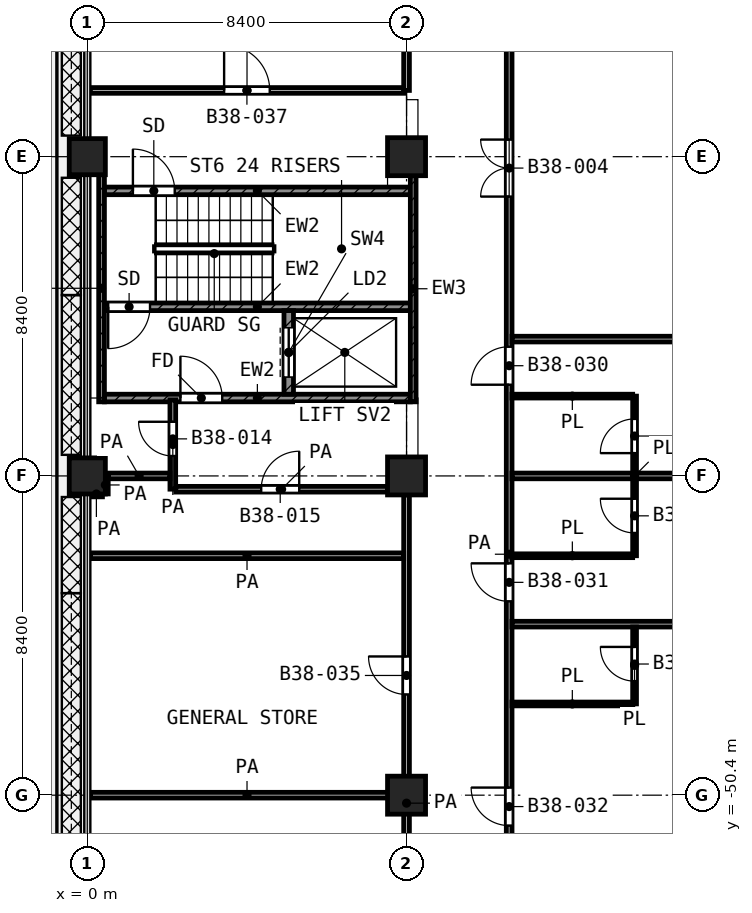
"""IFC4 building model, lengths in metres.
Left out: names, types, materials, properties, quantities, classifications, styles, units other than length and angle.
Written with IfcOpenShell. Run it as: python <this file> out.ifc"""

import sys

from ifc_helpers import new_model, si_unit, direction, frame, frame_2d, origin, origin_2d, place, context, subcontext, project, spatial, rectangle, extrude, element, fill, save


model = new_model("IFC4")
c1 = context("Model", 3, precision=1e-05, world=origin(), true_north=direction((0.0, 1.0)))
c2 = subcontext(c1, "Body", "Model", "MODEL_VIEW")
j1 = project(units=[si_unit("LENGTHUNIT", "METRE"), si_unit("PLANEANGLEUNIT", "RADIAN")], contexts=[c1])
p1 = place(None, origin())
s1 = spatial("IfcSite", under=j1, at=p1, CompositionType="ELEMENT")
p2 = place(p1, origin())
s2 = spatial("IfcBuilding", under=s1, at=p2, CompositionType="ELEMENT")
p3 = place(p2, frame((0.0, 0.0, 166.8)))
s3 = spatial("IfcBuildingStorey", under=s2, at=p3, CompositionType="ELEMENT", Elevation=166.8)
p4 = place(p3, frame((0.0, -33.6, 0.0), z_axis=(0.0, 0.0, 1.0), x_axis=(1.0, 0.0, 0.0)))
e1 = element("IfcColumn", 1, at=p4, inside=s3, PredefinedType="COLUMN", context=c2, shape_type="SweptSolid", body=[
    extrude(rectangle(XDim=0.95, YDim=0.95, at=origin_2d()), origin(), (0.0, 0.0, 1.0), 4.2),
])
p5 = place(p3, frame((8.4, -33.6, 0.0), z_axis=(0.0, 0.0, 1.0), x_axis=(1.0, 0.0, 0.0)))
e2 = element("IfcColumn", 2, at=p5, inside=s3, PredefinedType="COLUMN", context=c2, shape_type="SweptSolid", body=[
    extrude(rectangle(XDim=1.0, YDim=1.0, at=origin_2d()), origin(), (0.0, 0.0, 1.0), 4.2),
])
p6 = place(p3, frame((0.0, -42.0, 0.0), z_axis=(0.0, 0.0, 1.0), x_axis=(1.0, 0.0, 0.0)))
e3 = element("IfcColumn", 3, at=p6, inside=s3, PredefinedType="COLUMN", context=c2, shape_type="SweptSolid", body=[
    extrude(rectangle(XDim=0.95, YDim=0.95, at=origin_2d()), origin(), (0.0, 0.0, 1.0), 4.2),
])
for number, where, z_axis, x_axis in (
    (4, (8.4, -42.0, 0.0), (0.0, 0.0, 1.0), (1.0, 0.0, 0.0)),
    (5, (8.4, -50.4, 0.0), (0.0, 0.0, 1.0), (1.0, 0.0, 0.0)),
):
    element("IfcColumn", number, at=place(p3, frame(where, z_axis=z_axis, x_axis=x_axis)), inside=s3, PredefinedType="COLUMN", context=c2, shape_type="SweptSolid", body=[
        extrude(rectangle(XDim=1.0, YDim=1.0, at=origin_2d()), origin(), (0.0, 0.0, 1.0), 4.2),
    ])
p7 = place(p3, frame((0.375, -40.05, 0.0), z_axis=(0.0, 0.0, 1.0), x_axis=(0.0, 1.0, 0.0)))
e6 = element("IfcWall", 6, at=p7, inside=s3, PredefinedType="SHEAR", context=c2, shape_type="SweptSolid", body=[
    extrude(rectangle(XDim=5.975, YDim=0.15, at=frame_2d((2.988, 0.0))), origin(), (0.0, 0.0, 1.0), 3.6),
])
p8 = place(p3, frame((8.575, -40.05, 0.0), z_axis=(0.0, 0.0, 1.0), x_axis=(0.0, 1.0, 0.0)))
e7 = element("IfcWall", 7, at=p8, inside=s3, PredefinedType="SHEAR", context=c2, shape_type="SweptSolid", body=[
    extrude(rectangle(XDim=5.95, YDim=0.15, at=frame_2d((2.975, 0.0))), origin(), (0.0, 0.0, 1.0), 3.6),
])
p9 = place(p3, frame((0.45, -34.5, 0.0), z_axis=(0.0, 0.0, 1.0), x_axis=(1.0, 0.0, 0.0)))
e8 = element("IfcWall", 8, at=p9, inside=s3, PredefinedType="SHEAR", context=c2, shape_type="SweptSolid", body=[
    extrude(rectangle(XDim=8.05, YDim=0.2, at=frame_2d((4.025, 0.0))), origin(), (0.0, 0.0, 1.0), 3.6),
])
p10 = place(p9, frame((0.75, 0.0, 0.0)))
e9 = element("IfcOpeningElement", 9, at=p10, cuts=e8, PredefinedType="OPENING", context=c2, shape_type="SweptSolid", body=[
    extrude(rectangle(XDim=1.1, YDim=2.1, at=frame_2d((0.55, 1.05))), frame((0.0, 0.11, 0.0), z_axis=(0.0, -1.0, 0.0), x_axis=(1.0, 0.0, 0.0)), (0.0, 0.0, 1.0), 0.22),
])
p11 = place(p3, frame((0.45, -37.55, 0.0), z_axis=(0.0, 0.0, 1.0), x_axis=(1.0, 0.0, 0.0)))
e10 = element("IfcWall", 10, at=p11, inside=s3, PredefinedType="SHEAR", context=c2, shape_type="SweptSolid", body=[
    extrude(rectangle(XDim=8.05, YDim=0.2, at=frame_2d((4.025, 0.0))), origin(), (0.0, 0.0, 1.0), 3.6),
])
p12 = place(p11, frame((0.1, 0.0, 0.0)))
e11 = element("IfcOpeningElement", 11, at=p12, cuts=e10, PredefinedType="OPENING", context=c2, shape_type="SweptSolid", body=[
    extrude(rectangle(XDim=1.1, YDim=2.1, at=frame_2d((0.55, 1.05))), frame((0.0, 0.11, 0.0), z_axis=(0.0, -1.0, 0.0), x_axis=(1.0, 0.0, 0.0)), (0.0, 0.0, 1.0), 0.22),
])
p13 = place(p3, frame((0.45, -39.95, 0.0), z_axis=(0.0, 0.0, 1.0), x_axis=(1.0, 0.0, 0.0)))
e12 = element("IfcWall", 12, at=p13, inside=s3, PredefinedType="SHEAR", context=c2, shape_type="SweptSolid", body=[
    extrude(rectangle(XDim=8.05, YDim=0.2, at=frame_2d((4.025, 0.0))), origin(), (0.0, 0.0, 1.0), 3.6),
])
p14 = place(p13, frame((2.0, 0.0, 0.0)))
e13 = element("IfcOpeningElement", 13, at=p14, cuts=e12, PredefinedType="OPENING", context=c2, shape_type="SweptSolid", body=[
    extrude(rectangle(XDim=1.1, YDim=2.1, at=frame_2d((0.55, 1.05))), frame((0.0, 0.11, 0.0), z_axis=(0.0, -1.0, 0.0), x_axis=(1.0, 0.0, 0.0)), (0.0, 0.0, 1.0), 0.22),
])
p15 = place(p3, frame((5.3, -39.85, 0.0), z_axis=(0.0, 0.0, 1.0), x_axis=(0.0, 1.0, 0.0)))
e14 = element("IfcWall", 14, at=p15, inside=s3, PredefinedType="SHEAR", context=c2, shape_type="SweptSolid", body=[
    extrude(rectangle(XDim=2.2, YDim=0.25, at=frame_2d((1.1, 0.0))), origin(), (0.0, 0.0, 1.0), 3.6),
])
p16 = place(p15, frame((0.45, 0.0, 0.0)))
e15 = element("IfcOpeningElement", 15, at=p16, cuts=e14, PredefinedType="OPENING", context=c2, shape_type="SweptSolid", body=[
    extrude(rectangle(XDim=1.3, YDim=2.1, at=frame_2d((0.65, 1.05))), frame((0.0, 0.135, 0.0), z_axis=(0.0, -1.0, 0.0), x_axis=(1.0, 0.0, 0.0)), (0.0, 0.0, 1.0), 0.27),
])
p17 = place(p3, frame((11.175, -48.0, 0.0), z_axis=(0.0, 0.0, 1.0), x_axis=(1.0, 0.0, 0.0)))
e16 = element("IfcWall", 16, at=p17, inside=s3, PredefinedType="PARTITIONING", context=c2, shape_type="SweptSolid", body=[
    extrude(rectangle(XDim=3.174, YDim=0.1, at=frame_2d((1.587, 0.0))), origin(), (0.0, 0.0, 1.0), 3.6),
])
for number, where, z_axis, x_axis in (
    (17, (11.175, -44.1, 0.0), (0.0, 0.0, 1.0), (1.0, 0.0, 0.0)),
    (18, (11.175, -39.9, 0.0), (0.0, 0.0, 1.0), (1.0, 0.0, 0.0)),
):
    element("IfcWall", number, at=place(p3, frame(where, z_axis=z_axis, x_axis=x_axis)), inside=s3, PredefinedType="PARTITIONING", context=c2, shape_type="SweptSolid", body=[
        extrude(rectangle(XDim=3.175, YDim=0.1, at=frame_2d((1.587, 0.0))), origin(), (0.0, 0.0, 1.0), 3.6),
    ])
p18 = place(p3, frame((14.4, -47.998, 0.0), z_axis=(0.0, 0.0, 1.0), x_axis=(0.0, 1.0, 0.0)))
e19 = element("IfcWall", 19, at=p18, inside=s3, PredefinedType="PARTITIONING", context=c2, shape_type="SweptSolid", body=[
    extrude(rectangle(XDim=2.023, YDim=0.1, at=frame_2d((1.011, 0.0))), origin(), (0.0, 0.0, 1.0), 3.6),
])
p19 = place(p18, frame((0.599, 0.0, 0.0)))
e20 = element("IfcOpeningElement", 20, at=p19, cuts=e19, PredefinedType="OPENING", context=c2, shape_type="SweptSolid", body=[
    extrude(rectangle(XDim=0.9, YDim=2.1, at=frame_2d((0.45, 1.05))), frame((0.0, 0.06, 0.0), z_axis=(0.0, -1.0, 0.0), x_axis=(1.0, 0.0, 0.0)), (0.0, 0.0, 1.0), 0.12),
])
p20 = place(p3, frame((14.4, -44.1, 0.0), z_axis=(0.0, 0.0, 1.0), x_axis=(0.0, 1.0, 0.0)))
e21 = element("IfcWall", 21, at=p20, inside=s3, PredefinedType="PARTITIONING", context=c2, shape_type="SweptSolid", body=[
    extrude(rectangle(XDim=4.2, YDim=0.1, at=frame_2d((2.1, 0.0))), origin(), (0.0, 0.0, 1.0), 3.6),
])
p21 = place(p20, frame((2.7, 0.0, 0.0)))
e22 = element("IfcOpeningElement", 22, at=p21, cuts=e21, PredefinedType="OPENING", context=c2, shape_type="SweptSolid", body=[
    extrude(rectangle(XDim=0.9, YDim=2.1, at=frame_2d((0.45, 1.05))), frame((0.0, 0.06, 0.0), z_axis=(0.0, -1.0, 0.0), x_axis=(1.0, 0.0, 0.0)), (0.0, 0.0, 1.0), 0.12),
])
p22 = place(p20, frame((0.6, 0.0, 0.0)))
e23 = element("IfcOpeningElement", 23, at=p22, cuts=e21, PredefinedType="OPENING", context=c2, shape_type="SweptSolid", body=[
    extrude(rectangle(XDim=0.9, YDim=2.1, at=frame_2d((0.45, 1.05))), frame((0.0, 0.06, 0.0), z_axis=(0.0, -1.0, 0.0), x_axis=(1.0, 0.0, 0.0)), (0.0, 0.0, 1.0), 0.12),
])
p23 = place(p3, frame((0.08, -50.4, 0.0), z_axis=(0.0, 0.0, 1.0), x_axis=(1.0, 0.0, 0.0)))
e24 = element("IfcWall", 24, at=p23, inside=s3, PredefinedType="PARTITIONING", context=c2, shape_type="SweptSolid", body=[
    extrude(rectangle(XDim=8.245, YDim=0.15, at=frame_2d((4.123, 0.0))), origin(), (0.0, 0.0, 1.0), 3.6),
])
p24 = place(p3, frame((11.175, -45.9, 0.0), z_axis=(0.0, 0.0, 1.0), x_axis=(1.0, 0.0, 0.0)))
e25 = element("IfcWall", 25, at=p24, inside=s3, PredefinedType="PARTITIONING", context=c2, shape_type="SweptSolid", body=[
    extrude(rectangle(XDim=13.945, YDim=0.15, at=frame_2d((6.973, 0.0))), origin(), (0.0, 0.0, 1.0), 3.6),
])
p25 = place(p3, frame((0.08, -44.1, 0.0), z_axis=(0.0, 0.0, 1.0), x_axis=(1.0, 0.0, 0.0)))
e26 = element("IfcWall", 26, at=p25, inside=s3, PredefinedType="PARTITIONING", context=c2, shape_type="SweptSolid", body=[
    extrude(rectangle(XDim=8.245, YDim=0.15, at=frame_2d((4.123, 0.0))), origin(), (0.0, 0.0, 1.0), 3.6),
])
p26 = place(p3, frame((0.08, -42.475, 0.0), z_axis=(0.0, 0.0, 1.0), x_axis=(1.0, 0.0, 0.0)))
e27 = element("IfcWall", 27, at=p26, inside=s3, PredefinedType="PARTITIONING", context=c2, shape_type="SweptSolid", body=[
    extrude(rectangle(XDim=0.318, YDim=0.15, at=frame_2d((0.159, 0.0))), origin(), (0.0, 0.0, 1.0), 3.6),
])
p27 = place(p3, frame((2.327, -42.35, 0.0), z_axis=(0.0, 0.0, 1.0), x_axis=(1.0, 0.0, 0.0)))
e28 = element("IfcWall", 28, at=p27, inside=s3, PredefinedType="PARTITIONING", context=c2, shape_type="SweptSolid", body=[
    extrude(rectangle(XDim=5.573, YDim=0.15, at=frame_2d((2.787, 0.0))), origin(), (0.0, 0.0, 1.0), 3.6),
])
p28 = place(p27, frame((2.249, 0.0, 0.0)))
e29 = element("IfcOpeningElement", 29, at=p28, cuts=e28, PredefinedType="OPENING", context=c2, shape_type="SweptSolid", body=[
    extrude(rectangle(XDim=1.0, YDim=2.1, at=frame_2d((0.5, 1.05))), frame((0.0, 0.085, 0.0), z_axis=(0.0, -1.0, 0.0), x_axis=(1.0, 0.0, 0.0)), (0.0, 0.0, 1.0), 0.17),
])
p29 = place(p3, frame((0.552, -42.0, 0.0), z_axis=(0.0, 0.0, 1.0), x_axis=(1.0, 0.0, 0.0)))
e30 = element("IfcWall", 30, at=p29, inside=s3, PredefinedType="PARTITIONING", context=c2, shape_type="SweptSolid", body=[
    extrude(rectangle(XDim=1.623, YDim=0.15, at=frame_2d((0.812, 0.0))), origin(), (0.0, 0.0, 1.0), 3.6),
])
for number, where, z_axis, x_axis in (
    (31, (11.175, -42.0, 0.0), (0.0, 0.0, 1.0), (1.0, 0.0, 0.0)),
    (32, (11.175, -38.4, 0.0), (0.0, 0.0, 1.0), (1.0, 0.0, 0.0)),
):
    element("IfcWall", number, at=place(p3, frame(where, z_axis=z_axis, x_axis=x_axis)), inside=s3, PredefinedType="PARTITIONING", context=c2, shape_type="SweptSolid", body=[
        extrude(rectangle(XDim=13.945, YDim=0.15, at=frame_2d((6.973, 0.0))), origin(), (0.0, 0.0, 1.0), 3.6),
    ])
p30 = place(p3, frame((0.08, -31.857, 0.0), z_axis=(0.0, 0.0, 1.0), x_axis=(1.0, 0.0, 0.0)))
e33 = element("IfcWall", 33, at=p30, inside=s3, PredefinedType="PARTITIONING", context=c2, shape_type="SweptSolid", body=[
    extrude(rectangle(XDim=8.245, YDim=0.15, at=frame_2d((4.123, 0.0))), origin(), (0.0, 0.0, 1.0), 3.6),
])
p31 = place(p30, frame((3.52, 0.0, 0.0)))
e34 = element("IfcOpeningElement", 34, at=p31, cuts=e33, PredefinedType="OPENING", context=c2, shape_type="SweptSolid", body=[
    extrude(rectangle(XDim=1.2, YDim=2.1, at=frame_2d((0.6, 1.05))), frame((0.0, 0.085, 0.0), z_axis=(0.0, -1.0, 0.0), x_axis=(1.0, 0.0, 0.0)), (0.0, 0.0, 1.0), 0.17),
])
p32 = place(p3, frame((0.475, -42.473, 0.0), z_axis=(0.0, 0.0, 1.0), x_axis=(0.0, 1.0, 0.0)))
e35 = element("IfcWall", 35, at=p32, inside=s3, PredefinedType="PARTITIONING", context=c2, shape_type="SweptSolid", body=[
    extrude(rectangle(XDim=0.471, YDim=0.15, at=frame_2d((0.235, 0.0))), origin(), (0.0, 0.0, 1.0), 3.6),
])
p33 = place(p3, frame((2.25, -42.348, 0.0), z_axis=(0.0, 0.0, 1.0), x_axis=(0.0, 1.0, 0.0)))
e36 = element("IfcWall", 36, at=p33, inside=s3, PredefinedType="PARTITIONING", context=c2, shape_type="SweptSolid", body=[
    extrude(rectangle(XDim=2.348, YDim=0.15, at=frame_2d((1.174, 0.0))), origin(), (0.0, 0.0, 1.0), 3.6),
])
p34 = place(p33, frame((0.873, 0.0, 0.0)))
e37 = element("IfcOpeningElement", 37, at=p34, cuts=e36, PredefinedType="OPENING", context=c2, shape_type="SweptSolid", body=[
    extrude(rectangle(XDim=0.9, YDim=2.1, at=frame_2d((0.45, 1.05))), frame((0.0, 0.085, 0.0), z_axis=(0.0, -1.0, 0.0), x_axis=(1.0, 0.0, 0.0)), (0.0, 0.0, 1.0), 0.17),
])
p35 = place(p3, frame((8.4, -58.72, 0.0), z_axis=(0.0, 0.0, 1.0), x_axis=(0.0, 1.0, 0.0)))
e38 = element("IfcWall", 38, at=p35, inside=s3, PredefinedType="PARTITIONING", context=c2, shape_type="SweptSolid", body=[
    extrude(rectangle(XDim=16.22, YDim=0.15, at=frame_2d((8.11, 0.0))), origin(), (0.0, 0.0, 1.0), 3.6),
])
p36 = place(p35, frame((3.37, 0.0, 0.0)))
e39 = element("IfcOpeningElement", 39, at=p36, cuts=e38, PredefinedType="OPENING", context=c2, shape_type="SweptSolid", body=[
    extrude(rectangle(XDim=1.5, YDim=2.1, at=frame_2d((0.75, 1.05))), frame((0.0, 0.085, 0.0), z_axis=(0.0, -1.0, 0.0), x_axis=(1.0, 0.0, 0.0)), (0.0, 0.0, 1.0), 0.17),
])
p37 = place(p35, frame((10.97, 0.0, 0.0)))
e40 = element("IfcOpeningElement", 40, at=p37, cuts=e38, PredefinedType="OPENING", context=c2, shape_type="SweptSolid", body=[
    extrude(rectangle(XDim=1.0, YDim=2.1, at=frame_2d((0.5, 1.05))), frame((0.0, 0.085, 0.0), z_axis=(0.0, -1.0, 0.0), x_axis=(1.0, 0.0, 0.0)), (0.0, 0.0, 1.0), 0.17),
])
p38 = place(p3, frame((8.4, -31.857, 0.0), z_axis=(0.0, 0.0, 1.0), x_axis=(0.0, 1.0, 0.0)))
e41 = element("IfcWall", 41, at=p38, inside=s3, PredefinedType="PARTITIONING", context=c2, shape_type="SweptSolid", body=[
    extrude(rectangle(XDim=6.957, YDim=0.15, at=frame_2d((3.479, 0.0))), origin(), (0.0, 0.0, 1.0), 3.6),
])
p39 = place(p3, frame((11.1, -58.72, 0.0), z_axis=(0.0, 0.0, 1.0), x_axis=(0.0, 1.0, 0.0)))
e42 = element("IfcWall", 42, at=p39, inside=s3, PredefinedType="PARTITIONING", context=c2, shape_type="SweptSolid", body=[
    extrude(rectangle(XDim=29.32, YDim=0.15, at=frame_2d((14.66, 0.0))), origin(), (0.0, 0.0, 1.0), 3.6),
])
p40 = place(p39, frame((24.07, 0.0, 0.0)))
e43 = element("IfcOpeningElement", 43, at=p40, cuts=e42, PredefinedType="OPENING", context=c2, shape_type="SweptSolid", body=[
    extrude(rectangle(XDim=1.5, YDim=2.1, at=frame_2d((0.75, 1.05))), frame((0.0, 0.085, 0.0), z_axis=(0.0, -1.0, 0.0), x_axis=(1.0, 0.0, 0.0)), (0.0, 0.0, 1.0), 0.17),
])
p41 = place(p39, frame((19.12, 0.0, 0.0)))
e44 = element("IfcOpeningElement", 44, at=p41, cuts=e42, PredefinedType="OPENING", context=c2, shape_type="SweptSolid", body=[
    extrude(rectangle(XDim=1.0, YDim=2.1, at=frame_2d((0.5, 1.05))), frame((0.0, 0.085, 0.0), z_axis=(0.0, -1.0, 0.0), x_axis=(1.0, 0.0, 0.0)), (0.0, 0.0, 1.0), 0.17),
])
p42 = place(p39, frame((13.42, 0.0, 0.0)))
e45 = element("IfcOpeningElement", 45, at=p42, cuts=e42, PredefinedType="OPENING", context=c2, shape_type="SweptSolid", body=[
    extrude(rectangle(XDim=1.0, YDim=2.1, at=frame_2d((0.5, 1.05))), frame((0.0, 0.085, 0.0), z_axis=(0.0, -1.0, 0.0), x_axis=(1.0, 0.0, 0.0)), (0.0, 0.0, 1.0), 0.17),
])
p43 = place(p39, frame((7.52, 0.0, 0.0)))
e46 = element("IfcOpeningElement", 46, at=p43, cuts=e42, PredefinedType="OPENING", context=c2, shape_type="SweptSolid", body=[
    extrude(rectangle(XDim=1.0, YDim=2.1, at=frame_2d((0.5, 1.05))), frame((0.0, 0.085, 0.0), z_axis=(0.0, -1.0, 0.0), x_axis=(1.0, 0.0, 0.0)), (0.0, 0.0, 1.0), 0.17),
])
p44 = place(p39, frame((4.82, 0.0, 0.0)))
e47 = element("IfcOpeningElement", 47, at=p44, cuts=e42, PredefinedType="OPENING", context=c2, shape_type="SweptSolid", body=[
    extrude(rectangle(XDim=1.0, YDim=2.1, at=frame_2d((0.5, 1.05))), frame((0.0, 0.085, 0.0), z_axis=(0.0, -1.0, 0.0), x_axis=(1.0, 0.0, 0.0)), (0.0, 0.0, 1.0), 0.17),
])
p45 = place(p39, frame((2.12, 0.0, 0.0)))
e48 = element("IfcOpeningElement", 48, at=p45, cuts=e42, PredefinedType="OPENING", context=c2, shape_type="SweptSolid", body=[
    extrude(rectangle(XDim=1.0, YDim=2.1, at=frame_2d((0.5, 1.05))), frame((0.0, 0.085, 0.0), z_axis=(0.0, -1.0, 0.0), x_axis=(1.0, 0.0, 0.0)), (0.0, 0.0, 1.0), 0.17),
])
p46 = place(p10, origin())
e49 = element("IfcDoor", 49, at=p46, inside=s3, OperationType="SINGLE_SWING_LEFT", PredefinedType="DOOR", context=c2, shape_type="SweptSolid", body=[
    extrude(rectangle(XDim=1.1, YDim=2.1, at=frame_2d((0.55, 1.05))), frame((0.0, 0.025, 0.0), z_axis=(0.0, -1.0, 0.0), x_axis=(1.0, 0.0, 0.0)), (0.0, 0.0, 1.0), 0.05),
])
fill(e9, e49)
p47 = place(p12, frame((1.1, 0.0, 0.0), z_axis=(0.0, 0.0, 1.0), x_axis=(-1.0, 0.0, 0.0)))
e50 = element("IfcDoor", 50, at=p47, inside=s3, OperationType="SINGLE_SWING_LEFT", PredefinedType="DOOR", context=c2, shape_type="SweptSolid", body=[
    extrude(rectangle(XDim=1.1, YDim=2.1, at=frame_2d((0.55, 1.05))), frame((0.0, 0.025, 0.0), z_axis=(0.0, -1.0, 0.0), x_axis=(1.0, 0.0, 0.0)), (0.0, 0.0, 1.0), 0.05),
])
fill(e11, e50)
p48 = place(p16, origin())
e51 = element("IfcDoor", 51, at=p48, inside=s3, OperationType="DOUBLE_DOOR_SLIDING", PredefinedType="DOOR", context=c2, shape_type="SweptSolid", body=[
    extrude(rectangle(XDim=1.3, YDim=2.1, at=frame_2d((0.65, 1.05))), frame((0.0, 0.025, 0.0), z_axis=(0.0, -1.0, 0.0), x_axis=(1.0, 0.0, 0.0)), (0.0, 0.0, 1.0), 0.05),
])
fill(e15, e51)
p49 = place(p14, origin())
e52 = element("IfcDoor", 52, at=p49, inside=s3, OperationType="SINGLE_SWING_LEFT", PredefinedType="DOOR", context=c2, shape_type="SweptSolid", body=[
    extrude(rectangle(XDim=1.1, YDim=2.1, at=frame_2d((0.55, 1.05))), frame((0.0, 0.025, 0.0), z_axis=(0.0, -1.0, 0.0), x_axis=(1.0, 0.0, 0.0)), (0.0, 0.0, 1.0), 0.05),
])
fill(e13, e52)
p50 = place(p31, origin())
e53 = element("IfcDoor", 53, at=p50, inside=s3, OperationType="SINGLE_SWING_LEFT", PredefinedType="DOOR", context=c2, shape_type="SweptSolid", body=[
    extrude(rectangle(XDim=1.2, YDim=2.1, at=frame_2d((0.6, 1.05))), frame((0.0, 0.025, 0.0), z_axis=(0.0, -1.0, 0.0), x_axis=(1.0, 0.0, 0.0)), (0.0, 0.0, 1.0), 0.05),
])
fill(e34, e53)
p51 = place(p40, origin())
e54 = element("IfcDoor", 54, at=p51, inside=s3, OperationType="DOUBLE_DOOR_SINGLE_SWING", PredefinedType="DOOR", context=c2, shape_type="SweptSolid", body=[
    extrude(rectangle(XDim=1.5, YDim=2.1, at=frame_2d((0.75, 1.05))), frame((0.0, 0.025, 0.0), z_axis=(0.0, -1.0, 0.0), x_axis=(1.0, 0.0, 0.0)), (0.0, 0.0, 1.0), 0.05),
])
fill(e43, e54)
p52 = place(p41, origin())
e55 = element("IfcDoor", 55, at=p52, inside=s3, OperationType="SINGLE_SWING_LEFT", PredefinedType="DOOR", context=c2, shape_type="SweptSolid", body=[
    extrude(rectangle(XDim=1.0, YDim=2.1, at=frame_2d((0.5, 1.05))), frame((0.0, 0.025, 0.0), z_axis=(0.0, -1.0, 0.0), x_axis=(1.0, 0.0, 0.0)), (0.0, 0.0, 1.0), 0.05),
])
fill(e44, e55)
p53 = place(p21, origin())
e56 = element("IfcDoor", 56, at=p53, inside=s3, OperationType="SINGLE_SWING_LEFT", PredefinedType="DOOR", context=c2, shape_type="SweptSolid", body=[
    extrude(rectangle(XDim=0.9, YDim=2.1, at=frame_2d((0.45, 1.05))), frame((0.0, 0.025, 0.0), z_axis=(0.0, -1.0, 0.0), x_axis=(1.0, 0.0, 0.0)), (0.0, 0.0, 1.0), 0.05),
])
fill(e22, e56)
p54 = place(p42, origin())
e57 = element("IfcDoor", 57, at=p54, inside=s3, OperationType="SINGLE_SWING_RIGHT", PredefinedType="DOOR", context=c2, shape_type="SweptSolid", body=[
    extrude(rectangle(XDim=1.0, YDim=2.1, at=frame_2d((0.5, 1.05))), frame((0.0, 0.025, 0.0), z_axis=(0.0, -1.0, 0.0), x_axis=(1.0, 0.0, 0.0)), (0.0, 0.0, 1.0), 0.05),
])
fill(e45, e57)
p55 = place(p22, origin())
e58 = element("IfcDoor", 58, at=p55, inside=s3, OperationType="SINGLE_SWING_RIGHT", PredefinedType="DOOR", context=c2, shape_type="SweptSolid", body=[
    extrude(rectangle(XDim=0.9, YDim=2.1, at=frame_2d((0.45, 1.05))), frame((0.0, 0.025, 0.0), z_axis=(0.0, -1.0, 0.0), x_axis=(1.0, 0.0, 0.0)), (0.0, 0.0, 1.0), 0.05),
])
fill(e23, e58)
p56 = place(p43, origin())
e59 = element("IfcDoor", 59, at=p56, inside=s3, OperationType="SINGLE_SWING_RIGHT", PredefinedType="DOOR", context=c2, shape_type="SweptSolid", body=[
    extrude(rectangle(XDim=1.0, YDim=2.1, at=frame_2d((0.5, 1.05))), frame((0.0, 0.025, 0.0), z_axis=(0.0, -1.0, 0.0), x_axis=(1.0, 0.0, 0.0)), (0.0, 0.0, 1.0), 0.05),
])
fill(e46, e59)
p57 = place(p19, origin())
e60 = element("IfcDoor", 60, at=p57, inside=s3, OperationType="SINGLE_SWING_RIGHT", PredefinedType="DOOR", context=c2, shape_type="SweptSolid", body=[
    extrude(rectangle(XDim=0.9, YDim=2.1, at=frame_2d((0.45, 1.05))), frame((0.0, 0.025, 0.0), z_axis=(0.0, -1.0, 0.0), x_axis=(1.0, 0.0, 0.0)), (0.0, 0.0, 1.0), 0.05),
])
fill(e20, e60)
p58 = place(p34, origin())
e61 = element("IfcDoor", 61, at=p58, inside=s3, OperationType="SINGLE_SWING_RIGHT", PredefinedType="DOOR", context=c2, shape_type="SweptSolid", body=[
    extrude(rectangle(XDim=0.9, YDim=2.1, at=frame_2d((0.45, 1.05))), frame((0.0, 0.025, 0.0), z_axis=(0.0, -1.0, 0.0), x_axis=(1.0, 0.0, 0.0)), (0.0, 0.0, 1.0), 0.05),
])
fill(e37, e61)
p59 = place(p28, origin())
e62 = element("IfcDoor", 62, at=p59, inside=s3, OperationType="SINGLE_SWING_RIGHT", PredefinedType="DOOR", context=c2, shape_type="SweptSolid", body=[
    extrude(rectangle(XDim=1.0, YDim=2.1, at=frame_2d((0.5, 1.05))), frame((0.0, 0.025, 0.0), z_axis=(0.0, -1.0, 0.0), x_axis=(1.0, 0.0, 0.0)), (0.0, 0.0, 1.0), 0.05),
])
fill(e29, e62)
p60 = place(p37, origin())
e63 = element("IfcDoor", 63, at=p60, inside=s3, OperationType="SINGLE_SWING_RIGHT", PredefinedType="DOOR", context=c2, shape_type="SweptSolid", body=[
    extrude(rectangle(XDim=1.0, YDim=2.1, at=frame_2d((0.5, 1.05))), frame((0.0, 0.025, 0.0), z_axis=(0.0, -1.0, 0.0), x_axis=(1.0, 0.0, 0.0)), (0.0, 0.0, 1.0), 0.05),
])
fill(e40, e63)
save(model, sys.argv[1])
